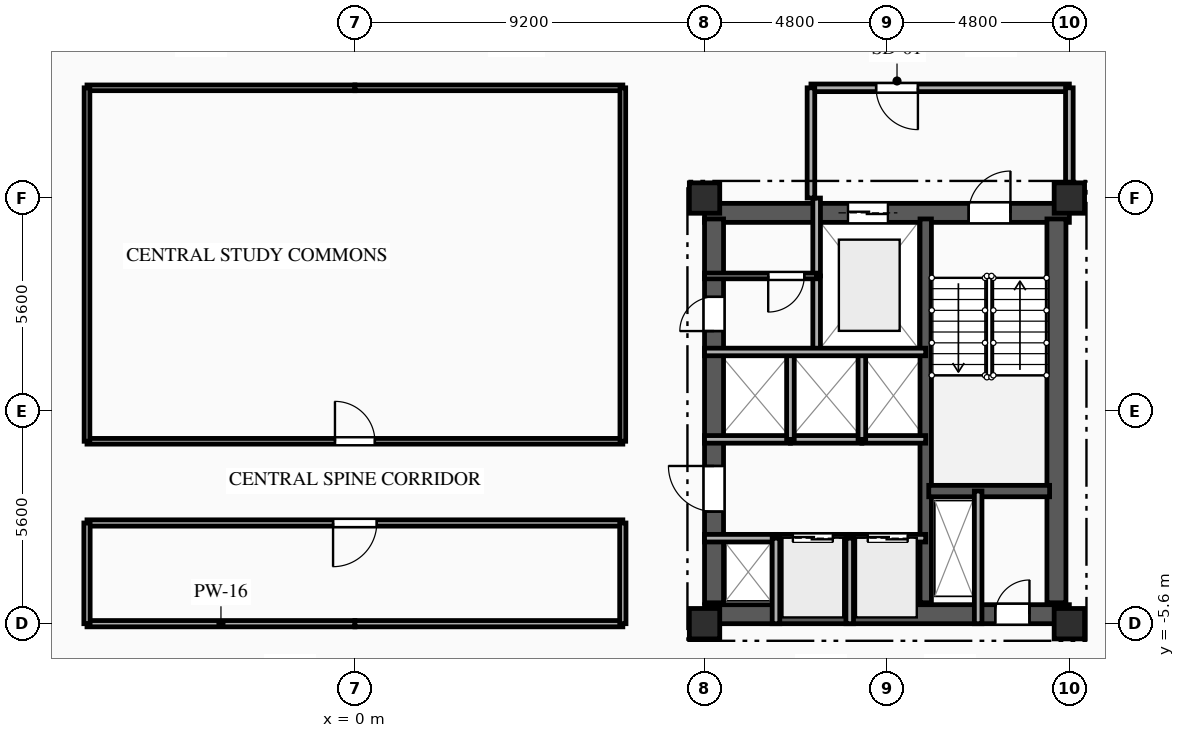
"""IFC4 building model, lengths in metres.
Left out: names, types, materials, properties, quantities, classifications, styles, units other than length and angle.
Written with IfcOpenShell. Run it as: python <this file> out.ifc"""

import sys

from ifc_helpers import new_model, si_unit, direction, frame, frame_2d, origin, origin_2d, place, context, subcontext, project, spatial, rectangle, extrude, element, fill, save


model = new_model("IFC4")
c1 = context("Model", 3, precision=1e-05, world=origin(), true_north=direction((0.0, 1.0)))
c2 = subcontext(c1, "Body", "Model", "MODEL_VIEW")
j1 = project(units=[si_unit("LENGTHUNIT", "METRE"), si_unit("PLANEANGLEUNIT", "RADIAN")], contexts=[c1])
p1 = place(None, origin())
s1 = spatial("IfcSite", under=j1, at=p1, CompositionType="ELEMENT")
p2 = place(p1, origin())
s2 = spatial("IfcBuilding", under=s1, at=p2, CompositionType="ELEMENT")
p3 = place(p2, frame((0.0, 0.0, 196.4)))
s3 = spatial("IfcBuildingStorey", under=s2, at=p3, CompositionType="ELEMENT", Elevation=196.4)
for number, where, z_axis, x_axis in (
    (1, (9.2, -5.6, 0.0), (0.0, 0.0, 1.0), (1.0, 0.0, 0.0)),
    (2, (9.2, 5.6, 0.0), (0.0, 0.0, 1.0), (1.0, 0.0, 0.0)),
    (3, (18.8, -5.6, 0.0), (0.0, 0.0, 1.0), (1.0, 0.0, 0.0)),
    (4, (18.8, 5.6, 0.0), (0.0, 0.0, 1.0), (1.0, 0.0, 0.0)),
):
    element("IfcColumn", number, at=place(p3, frame(where, z_axis=z_axis, x_axis=x_axis)), inside=s3, PredefinedType="COLUMN", context=c2, shape_type="SweptSolid", body=[
        extrude(rectangle(XDim=0.8, YDim=0.8, at=origin_2d()), origin(), (0.0, 0.0, 1.0), 3.35),
    ])
p4 = place(p3, frame((9.2, 5.21, 0.0), z_axis=(0.0, 0.0, 1.0), x_axis=(1.0, 0.0, 0.0)))
e5 = element("IfcWall", 5, at=p4, inside=s3, PredefinedType="SHEAR", context=c2, shape_type="SweptSolid", body=[
    extrude(rectangle(XDim=9.6, YDim=0.5, at=frame_2d((4.8, 0.0))), origin(), (0.0, 0.0, 1.0), 3.04),
])
p5 = place(p4, frame((6.95, 0.0, 0.0)))
e6 = element("IfcOpeningElement", 6, at=p5, cuts=e5, PredefinedType="OPENING", context=c2, shape_type="SweptSolid", body=[
    extrude(rectangle(XDim=1.1, YDim=2.15, at=frame_2d((0.55, 1.075))), frame((0.0, 0.26, 0.0), z_axis=(0.0, -1.0, 0.0), x_axis=(1.0, 0.0, 0.0)), (0.0, 0.0, 1.0), 0.52),
])
p6 = place(p4, frame((3.775, 0.0, 0.0)))
e7 = element("IfcOpeningElement", 7, at=p6, cuts=e5, PredefinedType="OPENING", context=c2, shape_type="SweptSolid", body=[
    extrude(rectangle(XDim=1.05, YDim=2.1, at=frame_2d((0.525, 1.05))), frame((0.0, 0.26, 0.0), z_axis=(0.0, -1.0, 0.0), x_axis=(1.0, 0.0, 0.0)), (0.0, 0.0, 1.0), 0.52),
])
p7 = place(p3, frame((9.2, -5.35, 0.0), z_axis=(0.0, 0.0, 1.0), x_axis=(1.0, 0.0, 0.0)))
e8 = element("IfcWall", 8, at=p7, inside=s3, PredefinedType="SHEAR", context=c2, shape_type="SweptSolid", body=[
    extrude(rectangle(XDim=9.6, YDim=0.5, at=frame_2d((4.8, 0.0))), origin(), (0.0, 0.0, 1.0), 3.04),
])
p8 = place(p7, frame((7.65, 0.0, 0.0)))
e9 = element("IfcOpeningElement", 9, at=p8, cuts=e8, PredefinedType="OPENING", context=c2, shape_type="SweptSolid", body=[
    extrude(rectangle(XDim=0.9, YDim=2.1, at=frame_2d((0.45, 1.05))), frame((0.0, 0.26, 0.0), z_axis=(0.0, -1.0, 0.0), x_axis=(1.0, 0.0, 0.0)), (0.0, 0.0, 1.0), 0.52),
])
p9 = place(p3, frame((9.45, -5.05, 0.0), z_axis=(0.0, 0.0, 1.0), x_axis=(0.0, 1.0, 0.0)))
e10 = element("IfcWall", 10, at=p9, inside=s3, PredefinedType="SHEAR", context=c2, shape_type="SweptSolid", body=[
    extrude(rectangle(XDim=10.1, YDim=0.5, at=frame_2d((5.05, 0.0))), origin(), (0.0, 0.0, 1.0), 3.04),
])
p10 = place(p9, frame((7.15, 0.0, 0.0)))
e11 = element("IfcOpeningElement", 11, at=p10, cuts=e10, PredefinedType="OPENING", context=c2, shape_type="SweptSolid", body=[
    extrude(rectangle(XDim=0.9, YDim=2.1, at=frame_2d((0.45, 1.05))), frame((0.0, 0.26, 0.0), z_axis=(0.0, -1.0, 0.0), x_axis=(1.0, 0.0, 0.0)), (0.0, 0.0, 1.0), 0.52),
])
p11 = place(p9, frame((2.4, 0.0, 0.0)))
e12 = element("IfcOpeningElement", 12, at=p11, cuts=e10, PredefinedType="OPENING", context=c2, shape_type="SweptSolid", body=[
    extrude(rectangle(XDim=1.2, YDim=2.15, at=frame_2d((0.6, 1.075))), frame((0.0, 0.26, 0.0), z_axis=(0.0, -1.0, 0.0), x_axis=(1.0, 0.0, 0.0)), (0.0, 0.0, 1.0), 0.52),
])
p12 = place(p3, frame((18.46, -5.05, 0.0), z_axis=(0.0, 0.0, 1.0), x_axis=(0.0, 1.0, 0.0)))
e13 = element("IfcWall", 13, at=p12, inside=s3, PredefinedType="SHEAR", context=c2, shape_type="SweptSolid", body=[
    extrude(rectangle(XDim=10.1, YDim=0.5, at=frame_2d((5.05, 0.0))), origin(), (0.0, 0.0, 1.0), 3.04),
])
p13 = place(p3, frame((15.02, -5.05, 0.0), z_axis=(0.0, 0.0, 1.0), x_axis=(0.0, 1.0, 0.0)))
e14 = element("IfcWall", 14, at=p13, inside=s3, PredefinedType="SHEAR", context=c2, shape_type="SweptSolid", body=[
    extrude(rectangle(XDim=10.1, YDim=0.3, at=frame_2d((5.05, 0.0))), origin(), (0.0, 0.0, 1.0), 3.04),
])
p14 = place(p3, frame((15.1, -2.11, 0.0), z_axis=(0.0, 0.0, 1.0), x_axis=(1.0, 0.0, 0.0)))
e15 = element("IfcWall", 15, at=p14, inside=s3, PredefinedType="SHEAR", context=c2, shape_type="SweptSolid", body=[
    extrude(rectangle(XDim=3.18, YDim=0.3, at=frame_2d((1.59, 0.0))), origin(), (0.0, 0.0, 1.0), 3.04),
])
p15 = place(p3, frame((16.4, -2.11, 0.0), z_axis=(0.0, 0.0, 1.0), x_axis=(0.0, -1.0, 0.0)))
e16 = element("IfcWall", 16, at=p15, inside=s3, PredefinedType="PARTITIONING", context=c2, shape_type="SweptSolid", body=[
    extrude(rectangle(XDim=3.49, YDim=0.2, at=frame_2d((1.745, 0.0))), origin(), (0.0, 0.0, 1.0), 3.04),
])
p16 = place(p3, frame((12.15, 3.55, 0.0), z_axis=(0.0, 0.0, 1.0), x_axis=(0.0, -1.0, 0.0)))
e17 = element("IfcWall", 17, at=p16, inside=s3, PredefinedType="PARTITIONING", context=c2, shape_type="SweptSolid", body=[
    extrude(rectangle(XDim=2.0, YDim=0.2, at=frame_2d((1.0, 0.0))), origin(), (0.0, 0.0, 1.0), 3.04),
])
p17 = place(p3, frame((12.15, 5.6, 0.0), z_axis=(0.0, 0.0, 1.0), x_axis=(0.0, -1.0, 0.0)))
e18 = element("IfcWall", 18, at=p17, inside=s3, PredefinedType="PARTITIONING", context=c2, shape_type="SweptSolid", body=[
    extrude(rectangle(XDim=2.05, YDim=0.2, at=frame_2d((1.025, 0.0))), origin(), (0.0, 0.0, 1.0), 3.04),
])
p18 = place(p3, frame((18.8, 8.5, 0.0), z_axis=(0.0, 0.0, 1.0), x_axis=(-1.0, 0.0, 0.0)))
e19 = element("IfcWall", 19, at=p18, inside=s3, PredefinedType="PARTITIONING", context=c2, shape_type="SweptSolid", body=[
    extrude(rectangle(XDim=6.8, YDim=0.2, at=frame_2d((3.4, 0.0))), origin(), (0.0, 0.0, 1.0), 3.04),
])
p19 = place(p18, frame((3.985, 0.0, 0.0)))
e20 = element("IfcOpeningElement", 20, at=p19, cuts=e19, PredefinedType="OPENING", context=c2, shape_type="SweptSolid", body=[
    extrude(rectangle(XDim=1.1, YDim=2.15, at=frame_2d((0.55, 1.075))), frame((0.0, 0.11, 0.0), z_axis=(0.0, -1.0, 0.0), x_axis=(1.0, 0.0, 0.0)), (0.0, 0.0, 1.0), 0.22),
])
p20 = place(p3, frame((18.8, 5.6, 0.0), z_axis=(0.0, 0.0, 1.0), x_axis=(0.0, 1.0, 0.0)))
e21 = element("IfcWall", 21, at=p20, inside=s3, PredefinedType="PARTITIONING", context=c2, shape_type="SweptSolid", body=[
    extrude(rectangle(XDim=2.9, YDim=0.2, at=frame_2d((1.45, 0.0))), origin(), (0.0, 0.0, 1.0), 2.665),
])
p21 = place(p3, frame((12.0, 8.5, 0.0), z_axis=(0.0, 0.0, 1.0), x_axis=(0.0, -1.0, 0.0)))
e22 = element("IfcWall", 22, at=p21, inside=s3, PredefinedType="PARTITIONING", context=c2, shape_type="SweptSolid", body=[
    extrude(rectangle(XDim=2.9, YDim=0.2, at=frame_2d((1.45, 0.0))), origin(), (0.0, 0.0, 1.0), 3.04),
])
p22 = place(p3, frame((12.15, 3.55, 0.0), z_axis=(0.0, 0.0, 1.0), x_axis=(-1.0, 0.0, 0.0)))
e23 = element("IfcWall", 23, at=p22, inside=s3, PredefinedType="PARTITIONING", context=c2, shape_type="SweptSolid", body=[
    extrude(rectangle(XDim=2.95, YDim=0.15, at=frame_2d((1.475, 0.0))), origin(), (0.0, 0.0, 1.0), 3.04),
])
p23 = place(p22, frame((0.325, 0.0, 0.0)))
e24 = element("IfcOpeningElement", 24, at=p23, cuts=e23, PredefinedType="OPENING", context=c2, shape_type="SweptSolid", body=[
    extrude(rectangle(XDim=0.95, YDim=2.1, at=frame_2d((0.475, 1.05))), frame((0.0, 0.085, 0.0), z_axis=(0.0, -1.0, 0.0), x_axis=(1.0, 0.0, 0.0)), (0.0, 0.0, 1.0), 0.17),
])
p24 = place(p3, frame((9.2, -3.35, 0.0), z_axis=(0.0, 0.0, 1.0), x_axis=(1.0, 0.0, 0.0)))
e25 = element("IfcWall", 25, at=p24, inside=s3, PredefinedType="PARTITIONING", context=c2, shape_type="SweptSolid", body=[
    extrude(rectangle(XDim=1.88, YDim=0.2, at=frame_2d((0.94, 0.0))), origin(), (0.0, 0.0, 1.0), 2.755),
])
p25 = place(p3, frame((11.08, -3.35, 0.0), z_axis=(0.0, 0.0, 1.0), x_axis=(1.0, 0.0, 0.0)))
e26 = element("IfcWall", 26, at=p25, inside=s3, PredefinedType="PARTITIONING", context=c2, shape_type="SweptSolid", body=[
    extrude(rectangle(XDim=1.94, YDim=0.2, at=frame_2d((0.97, 0.0))), origin(), (0.0, 0.0, 1.0), 3.04),
])
p26 = place(p25, frame((0.445, 0.0, 0.0)))
e27 = element("IfcOpeningElement", 27, at=p26, cuts=e26, PredefinedType="OPENING", context=c2, shape_type="SweptSolid", body=[
    extrude(rectangle(XDim=1.05, YDim=2.1, at=frame_2d((0.525, 1.05))), frame((0.0, 0.11, 0.0), z_axis=(0.0, -1.0, 0.0), x_axis=(1.0, 0.0, 0.0)), (0.0, 0.0, 1.0), 0.22),
])
p27 = place(p3, frame((13.02, -3.35, 0.0), z_axis=(0.0, 0.0, 1.0), x_axis=(1.0, 0.0, 0.0)))
e28 = element("IfcWall", 28, at=p27, inside=s3, PredefinedType="PARTITIONING", context=c2, shape_type="SweptSolid", body=[
    extrude(rectangle(XDim=2.0, YDim=0.2, at=frame_2d((1.0, 0.0))), origin(), (0.0, 0.0, 1.0), 3.04),
])
p28 = place(p27, frame((0.475, 0.0, 0.0)))
e29 = element("IfcOpeningElement", 29, at=p28, cuts=e28, PredefinedType="OPENING", context=c2, shape_type="SweptSolid", body=[
    extrude(rectangle(XDim=1.05, YDim=2.1, at=frame_2d((0.525, 1.05))), frame((0.0, 0.11, 0.0), z_axis=(0.0, -1.0, 0.0), x_axis=(1.0, 0.0, 0.0)), (0.0, 0.0, 1.0), 0.22),
])
p29 = place(p3, frame((11.46, -0.75, 0.0), z_axis=(0.0, 0.0, 1.0), x_axis=(-1.0, 0.0, 0.0)))
e30 = element("IfcWall", 30, at=p29, inside=s3, PredefinedType="PARTITIONING", context=c2, shape_type="SweptSolid", body=[
    extrude(rectangle(XDim=2.26, YDim=0.2, at=frame_2d((1.13, 0.0))), origin(), (0.0, 0.0, 1.0), 3.04),
])
p30 = place(p3, frame((13.34, -0.75, 0.0), z_axis=(0.0, 0.0, 1.0), x_axis=(-1.0, 0.0, 0.0)))
e31 = element("IfcWall", 31, at=p30, inside=s3, PredefinedType="PARTITIONING", context=c2, shape_type="SweptSolid", body=[
    extrude(rectangle(XDim=1.88, YDim=0.2, at=frame_2d((0.94, 0.0))), origin(), (0.0, 0.0, 1.0), 3.04),
])
p31 = place(p3, frame((15.02, -0.75, 0.0), z_axis=(0.0, 0.0, 1.0), x_axis=(-1.0, 0.0, 0.0)))
e32 = element("IfcWall", 32, at=p31, inside=s3, PredefinedType="PARTITIONING", context=c2, shape_type="SweptSolid", body=[
    extrude(rectangle(XDim=1.68, YDim=0.2, at=frame_2d((0.84, 0.0))), origin(), (0.0, 0.0, 1.0), 3.04),
])
for number, where, z_axis, x_axis in (
    (33, (11.08, -5.6, 0.0), (0.0, 0.0, 1.0), (0.0, 1.0, 0.0)),
    (34, (13.02, -5.6, 0.0), (0.0, 0.0, 1.0), (0.0, 1.0, 0.0)),
):
    element("IfcWall", number, at=place(p3, frame(where, z_axis=z_axis, x_axis=x_axis)), inside=s3, PredefinedType="PARTITIONING", context=c2, shape_type="SweptSolid", body=[
        extrude(rectangle(XDim=2.25, YDim=0.2, at=frame_2d((1.125, 0.0))), origin(), (0.0, 0.0, 1.0), 3.04),
    ])
for number, where, z_axis, x_axis in (
    (35, (11.46, -0.75, 0.0), (0.0, 0.0, 1.0), (0.0, 1.0, 0.0)),
    (36, (13.34, -0.75, 0.0), (0.0, 0.0, 1.0), (0.0, 1.0, 0.0)),
):
    element("IfcWall", number, at=place(p3, frame(where, z_axis=z_axis, x_axis=x_axis)), inside=s3, PredefinedType="PARTITIONING", context=c2, shape_type="SweptSolid", body=[
        extrude(rectangle(XDim=2.3, YDim=0.2, at=frame_2d((1.15, 0.0))), origin(), (0.0, 0.0, 1.0), 3.04),
    ])
for number, where, z_axis, x_axis in (
    (37, (0.0, 8.5, 0.0), (0.0, 0.0, 1.0), (-1.0, 0.0, 0.0)),
    (38, (7.05, 8.5, 0.0), (0.0, 0.0, 1.0), (-1.0, 0.0, 0.0)),
):
    element("IfcWall", number, at=place(p3, frame(where, z_axis=z_axis, x_axis=x_axis)), inside=s3, PredefinedType="PARTITIONING", context=c2, shape_type="SweptSolid", body=[
        extrude(rectangle(XDim=7.05, YDim=0.15, at=frame_2d((3.525, 0.0))), origin(), (0.0, 0.0, 1.0), 3.04),
    ])
for number, where, z_axis, x_axis in (
    (39, (-7.05, -5.6, 0.0), (0.0, 0.0, 1.0), (1.0, 0.0, 0.0)),
    (40, (0.0, -5.6, 0.0), (0.0, 0.0, 1.0), (1.0, 0.0, 0.0)),
):
    element("IfcWall", number, at=place(p3, frame(where, z_axis=z_axis, x_axis=x_axis)), inside=s3, PredefinedType="PARTITIONING", context=c2, shape_type="SweptSolid", body=[
        extrude(rectangle(XDim=7.05, YDim=0.165, at=frame_2d((3.525, 0.0))), origin(), (0.0, 0.0, 1.0), 2.525),
    ])
p32 = place(p3, frame((-7.05, -0.8, 0.0), z_axis=(0.0, 0.0, 1.0), x_axis=(1.0, 0.0, 0.0)))
e41 = element("IfcWall", 41, at=p32, inside=s3, PredefinedType="PARTITIONING", context=c2, shape_type="SweptSolid", body=[
    extrude(rectangle(XDim=14.1, YDim=0.15, at=frame_2d((7.05, 0.0))), origin(), (0.0, 0.0, 1.0), 3.04),
])
p33 = place(p32, frame((6.525, 0.0, 0.0)))
e42 = element("IfcOpeningElement", 42, at=p33, cuts=e41, PredefinedType="OPENING", context=c2, shape_type="SweptSolid", body=[
    extrude(rectangle(XDim=1.05, YDim=2.15, at=frame_2d((0.525, 1.075))), frame((0.0, 0.085, 0.0), z_axis=(0.0, -1.0, 0.0), x_axis=(1.0, 0.0, 0.0)), (0.0, 0.0, 1.0), 0.17),
])
p34 = place(p3, frame((7.05, -2.95, 0.0), z_axis=(0.0, 0.0, 1.0), x_axis=(-1.0, 0.0, 0.0)))
e43 = element("IfcWall", 43, at=p34, inside=s3, PredefinedType="PARTITIONING", context=c2, shape_type="SweptSolid", body=[
    extrude(rectangle(XDim=14.1, YDim=0.165, at=frame_2d((7.05, 0.0))), origin(), (0.0, 0.0, 1.0), 3.04),
])
p35 = place(p34, frame((6.475, 0.0, 0.0)))
e44 = element("IfcOpeningElement", 44, at=p35, cuts=e43, PredefinedType="OPENING", context=c2, shape_type="SweptSolid", body=[
    extrude(rectangle(XDim=1.15, YDim=2.15, at=frame_2d((0.575, 1.075))), frame((0.0, 0.093, 0.0), z_axis=(0.0, -1.0, 0.0), x_axis=(1.0, 0.0, 0.0)), (0.0, 0.0, 1.0), 0.185),
])
p36 = place(p3, frame((-7.05, 8.5, 0.0), z_axis=(0.0, 0.0, 1.0), x_axis=(0.0, -1.0, 0.0)))
e45 = element("IfcWall", 45, at=p36, inside=s3, PredefinedType="PARTITIONING", context=c2, shape_type="SweptSolid", body=[
    extrude(rectangle(XDim=9.3, YDim=0.15, at=frame_2d((4.65, 0.0))), origin(), (0.0, 0.0, 1.0), 3.04),
])
p37 = place(p3, frame((-7.05, -2.95, 0.0), z_axis=(0.0, 0.0, 1.0), x_axis=(0.0, -1.0, 0.0)))
e46 = element("IfcWall", 46, at=p37, inside=s3, PredefinedType="PARTITIONING", context=c2, shape_type="SweptSolid", body=[
    extrude(rectangle(XDim=2.65, YDim=0.165, at=frame_2d((1.325, 0.0))), origin(), (0.0, 0.0, 1.0), 3.04),
])
p38 = place(p3, frame((7.05, -0.8, 0.0), z_axis=(0.0, 0.0, 1.0), x_axis=(0.0, 1.0, 0.0)))
e47 = element("IfcWall", 47, at=p38, inside=s3, PredefinedType="PARTITIONING", context=c2, shape_type="SweptSolid", body=[
    extrude(rectangle(XDim=9.3, YDim=0.15, at=frame_2d((4.65, 0.0))), origin(), (0.0, 0.0, 1.0), 3.04),
])
p39 = place(p3, frame((7.05, -5.6, 0.0), z_axis=(0.0, 0.0, 1.0), x_axis=(0.0, 1.0, 0.0)))
e48 = element("IfcWall", 48, at=p39, inside=s3, PredefinedType="PARTITIONING", context=c2, shape_type="SweptSolid", body=[
    extrude(rectangle(XDim=2.65, YDim=0.165, at=frame_2d((1.325, 0.0))), origin(), (0.0, 0.0, 1.0), 3.04),
])
p40 = place(p3, frame((9.2, 1.55, 0.0), z_axis=(0.0, 0.0, 1.0), x_axis=(1.0, 0.0, 0.0)))
e49 = element("IfcWall", 49, at=p40, inside=s3, PredefinedType="PARTITIONING", context=c2, shape_type="SweptSolid", body=[
    extrude(rectangle(XDim=5.82, YDim=0.2, at=frame_2d((2.91, 0.0))), origin(), (0.0, 0.0, 1.0), 3.04),
])
p41 = place(p5, origin())
e50 = element("IfcDoor", 50, at=p41, inside=s3, OperationType="SINGLE_SWING_RIGHT", PredefinedType="DOOR", context=c2, shape_type="SweptSolid", body=[
    extrude(rectangle(XDim=1.1, YDim=2.15, at=frame_2d((0.55, 1.075))), frame((0.0, 0.025, 0.0), z_axis=(0.0, -1.0, 0.0), x_axis=(1.0, 0.0, 0.0)), (0.0, 0.0, 1.0), 0.05),
])
fill(e6, e50)
p42 = place(p6, origin())
e51 = element("IfcDoor", 51, at=p42, inside=s3, OperationType="DOUBLE_DOOR_SLIDING", PredefinedType="DOOR", context=c2, shape_type="SweptSolid", body=[
    extrude(rectangle(XDim=1.05, YDim=2.1, at=frame_2d((0.525, 1.05))), frame((0.0, 0.025, 0.0), z_axis=(0.0, -1.0, 0.0), x_axis=(1.0, 0.0, 0.0)), (0.0, 0.0, 1.0), 0.05),
])
fill(e7, e51)
p43 = place(p8, origin())
e52 = element("IfcDoor", 52, at=p43, inside=s3, OperationType="SINGLE_SWING_RIGHT", PredefinedType="DOOR", context=c2, shape_type="SweptSolid", body=[
    extrude(rectangle(XDim=0.9, YDim=2.1, at=frame_2d((0.45, 1.05))), frame((0.0, 0.025, 0.0), z_axis=(0.0, -1.0, 0.0), x_axis=(1.0, 0.0, 0.0)), (0.0, 0.0, 1.0), 0.05),
])
fill(e9, e52)
p44 = place(p19, origin())
e53 = element("IfcDoor", 53, at=p44, inside=s3, OperationType="SINGLE_SWING_LEFT", PredefinedType="DOOR", context=c2, shape_type="SweptSolid", body=[
    extrude(rectangle(XDim=1.1, YDim=2.15, at=frame_2d((0.55, 1.075))), frame((0.0, 0.025, 0.0), z_axis=(0.0, -1.0, 0.0), x_axis=(1.0, 0.0, 0.0)), (0.0, 0.0, 1.0), 0.05),
])
fill(e20, e53)
p45 = place(p23, origin())
e54 = element("IfcDoor", 54, at=p45, inside=s3, OperationType="SINGLE_SWING_RIGHT", PredefinedType="DOOR", context=c2, shape_type="SweptSolid", body=[
    extrude(rectangle(XDim=0.95, YDim=2.1, at=frame_2d((0.475, 1.05))), frame((0.0, 0.025, 0.0), z_axis=(0.0, -1.0, 0.0), x_axis=(1.0, 0.0, 0.0)), (0.0, 0.0, 1.0), 0.05),
])
fill(e24, e54)
p46 = place(p10, origin())
e55 = element("IfcDoor", 55, at=p46, inside=s3, OperationType="SINGLE_SWING_LEFT", PredefinedType="DOOR", context=c2, shape_type="SweptSolid", body=[
    extrude(rectangle(XDim=0.9, YDim=2.1, at=frame_2d((0.45, 1.05))), frame((0.0, 0.025, 0.0), z_axis=(0.0, -1.0, 0.0), x_axis=(1.0, 0.0, 0.0)), (0.0, 0.0, 1.0), 0.05),
])
fill(e11, e55)
p47 = place(p26, origin())
e56 = element("IfcDoor", 56, at=p47, inside=s3, OperationType="DOUBLE_DOOR_SLIDING", PredefinedType="DOOR", context=c2, shape_type="SweptSolid", body=[
    extrude(rectangle(XDim=1.05, YDim=2.1, at=frame_2d((0.525, 1.05))), frame((0.0, 0.025, 0.0), z_axis=(0.0, -1.0, 0.0), x_axis=(1.0, 0.0, 0.0)), (0.0, 0.0, 1.0), 0.05),
])
fill(e27, e56)
p48 = place(p28, origin())
e57 = element("IfcDoor", 57, at=p48, inside=s3, OperationType="DOUBLE_DOOR_SLIDING", PredefinedType="DOOR", context=c2, shape_type="SweptSolid", body=[
    extrude(rectangle(XDim=1.05, YDim=2.1, at=frame_2d((0.525, 1.05))), frame((0.0, 0.025, 0.0), z_axis=(0.0, -1.0, 0.0), x_axis=(1.0, 0.0, 0.0)), (0.0, 0.0, 1.0), 0.05),
])
fill(e29, e57)
p49 = place(p11, origin())
e58 = element("IfcDoor", 58, at=p49, inside=s3, OperationType="SINGLE_SWING_RIGHT", PredefinedType="DOOR", context=c2, shape_type="SweptSolid", body=[
    extrude(rectangle(XDim=1.2, YDim=2.15, at=frame_2d((0.6, 1.075))), frame((0.0, 0.025, 0.0), z_axis=(0.0, -1.0, 0.0), x_axis=(1.0, 0.0, 0.0)), (0.0, 0.0, 1.0), 0.05),
])
fill(e12, e58)
p50 = place(p33, origin())
e59 = element("IfcDoor", 59, at=p50, inside=s3, OperationType="SINGLE_SWING_LEFT", PredefinedType="DOOR", context=c2, shape_type="SweptSolid", body=[
    extrude(rectangle(XDim=1.05, YDim=2.15, at=frame_2d((0.525, 1.075))), frame((0.0, 0.025, 0.0), z_axis=(0.0, -1.0, 0.0), x_axis=(1.0, 0.0, 0.0)), (0.0, 0.0, 1.0), 0.05),
])
fill(e42, e59)
p51 = place(p35, origin())
e60 = element("IfcDoor", 60, at=p51, inside=s3, OperationType="SINGLE_SWING_RIGHT", PredefinedType="DOOR", context=c2, shape_type="SweptSolid", body=[
    extrude(rectangle(XDim=1.15, YDim=2.15, at=frame_2d((0.575, 1.075))), frame((0.0, 0.025, 0.0), z_axis=(0.0, -1.0, 0.0), x_axis=(1.0, 0.0, 0.0)), (0.0, 0.0, 1.0), 0.05),
])
fill(e44, e60)
save(model, sys.argv[1])
